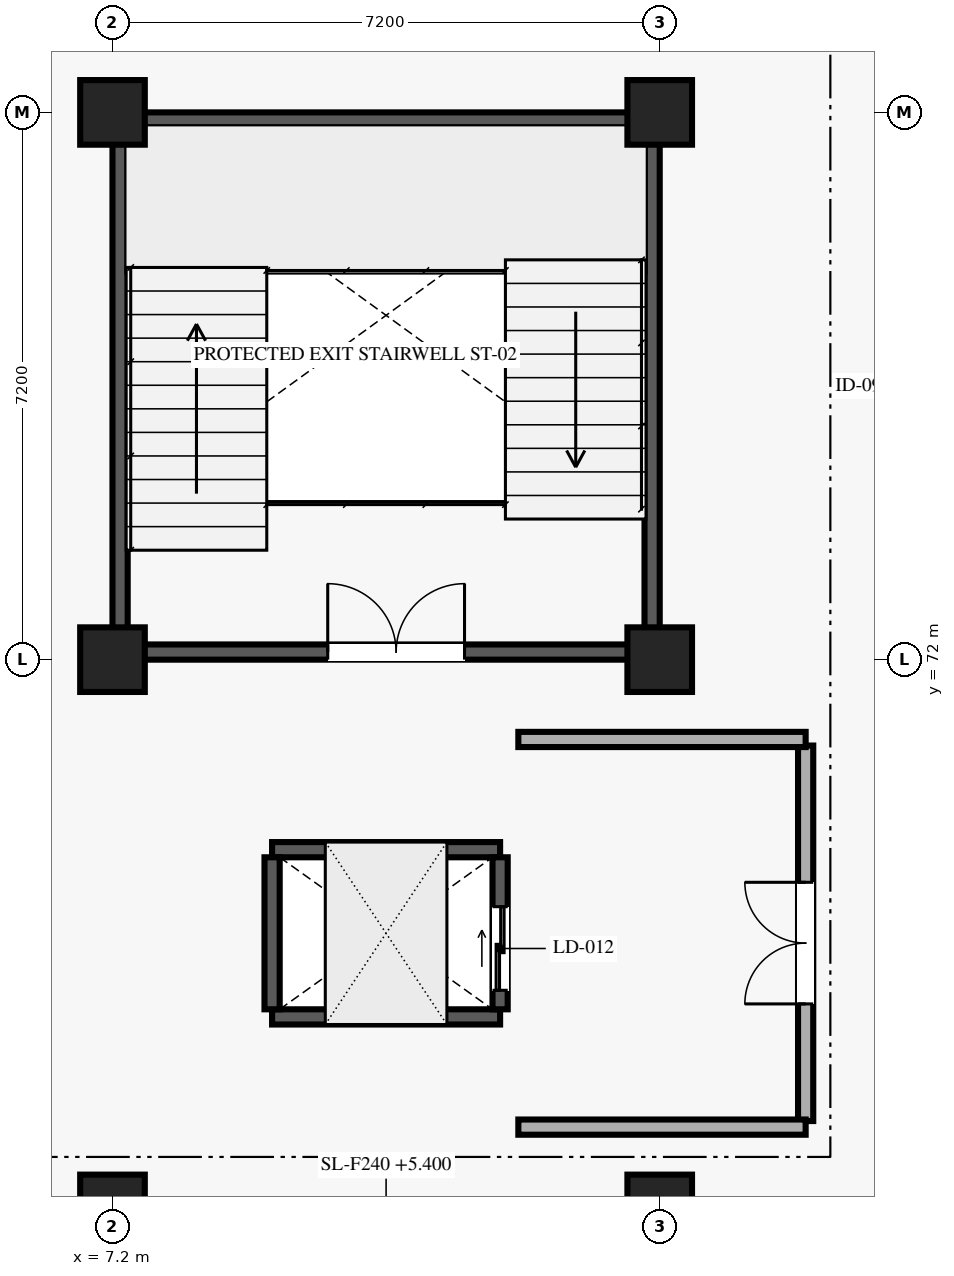
"""IFC4 building model, lengths in metres.
Left out: names, types, materials, properties, quantities, classifications, styles, units other than length and angle.
Written with IfcOpenShell. Run it as: python <this file> out.ifc"""

import sys

from ifc_helpers import new_model, si_unit, direction, frame, frame_2d, origin, origin_2d, place, context, subcontext, project, spatial, rectangle, extrude, element, fill, save


model = new_model("IFC4")
c1 = context("Model", 3, precision=1e-05, world=origin(), true_north=direction((0.0, 1.0)))
c2 = subcontext(c1, "Body", "Model", "MODEL_VIEW")
j1 = project(units=[si_unit("LENGTHUNIT", "METRE"), si_unit("PLANEANGLEUNIT", "RADIAN")], contexts=[c1])
p1 = place(None, origin())
s1 = spatial("IfcSite", under=j1, at=p1, CompositionType="ELEMENT")
p2 = place(p1, origin())
s2 = spatial("IfcBuilding", under=s1, at=p2, CompositionType="ELEMENT")
p3 = place(p2, frame((0.0, 0.0, 5.4)))
s3 = spatial("IfcBuildingStorey", under=s2, at=p3, CompositionType="ELEMENT", Elevation=5.4)
for number, where, z_axis, x_axis in (
    (1, (7.2, 64.8, 0.0), (0.0, 0.0, 1.0), (1.0, 0.0, 0.0)),
    (2, (7.2, 72.0, 0.0), (0.0, 0.0, 1.0), (1.0, 0.0, 0.0)),
    (3, (7.2, 79.2, 0.0), (0.0, 0.0, 1.0), (1.0, 0.0, 0.0)),
    (4, (14.4, 64.8, 0.0), (0.0, 0.0, 1.0), (1.0, 0.0, 0.0)),
    (5, (14.4, 72.0, 0.0), (0.0, 0.0, 1.0), (1.0, 0.0, 0.0)),
    (6, (14.4, 79.2, 0.0), (0.0, 0.0, 1.0), (1.0, 0.0, 0.0)),
):
    element("IfcColumn", number, at=place(p3, frame(where, z_axis=z_axis, x_axis=x_axis)), inside=s3, PredefinedType="COLUMN", context=c2, shape_type="SweptSolid", body=[
        extrude(rectangle(XDim=0.85, YDim=0.85, at=origin_2d()), origin(), (0.0, 0.0, 1.0), 4.05),
    ])
p4 = place(p3, frame((7.4, 72.1, 0.0), z_axis=(0.0, 0.0, 1.0), x_axis=(1.0, 0.0, 0.0)))
e7 = element("IfcWall", 7, at=p4, inside=s3, PredefinedType="SHEAR", context=c2, shape_type="SweptSolid", body=[
    extrude(rectangle(XDim=6.8, YDim=0.2, at=frame_2d((3.4, 0.0))), origin(), (0.0, 0.0, 1.0), 3.81),
])
p5 = place(p4, frame((2.632, 0.0, 0.0)))
e8 = element("IfcOpeningElement", 8, at=p5, cuts=e7, PredefinedType="OPENING", context=c2, shape_type="SweptSolid", body=[
    extrude(rectangle(XDim=1.8, YDim=2.2, at=frame_2d((0.9, 1.1))), frame((0.0, 0.11, 0.0), z_axis=(0.0, -1.0, 0.0), x_axis=(1.0, 0.0, 0.0)), (0.0, 0.0, 1.0), 0.22),
])
for number, where, z_axis, x_axis in (
    (9, (7.4, 79.1, 0.0), (0.0, 0.0, 1.0), (1.0, 0.0, 0.0)),
    (10, (7.3, 72.2, 0.0), (0.0, 0.0, 1.0), (0.0, 1.0, 0.0)),
    (11, (14.3, 72.2, 0.0), (0.0, 0.0, 1.0), (0.0, 1.0, 0.0)),
):
    element("IfcWall", number, at=place(p3, frame(where, z_axis=z_axis, x_axis=x_axis)), inside=s3, PredefinedType="SHEAR", context=c2, shape_type="SweptSolid", body=[
        extrude(rectangle(XDim=6.8, YDim=0.2, at=frame_2d((3.4, 0.0))), origin(), (0.0, 0.0, 1.0), 3.81),
    ])
for number, where, z_axis, x_axis in (
    (12, (9.3, 67.3, 0.0), (0.0, 0.0, 1.0), (1.0, 0.0, 0.0)),
    (13, (9.3, 69.5, 0.0), (0.0, 0.0, 1.0), (1.0, 0.0, 0.0)),
):
    element("IfcWall", number, at=place(p3, frame(where, z_axis=z_axis, x_axis=x_axis)), inside=s3, PredefinedType="SHEAR", context=c2, shape_type="SweptSolid", body=[
        extrude(rectangle(XDim=3.0, YDim=0.2, at=frame_2d((1.5, 0.0))), origin(), (0.0, 0.0, 1.0), 3.81),
    ])
p6 = place(p3, frame((9.3, 67.4, 0.0), z_axis=(0.0, 0.0, 1.0), x_axis=(0.0, 1.0, 0.0)))
e14 = element("IfcWall", 14, at=p6, inside=s3, PredefinedType="SHEAR", context=c2, shape_type="SweptSolid", body=[
    extrude(rectangle(XDim=2.0, YDim=0.2, at=frame_2d((1.0, 0.0))), origin(), (0.0, 0.0, 1.0), 3.81),
])
p7 = place(p3, frame((12.3, 67.4, 0.0), z_axis=(0.0, 0.0, 1.0), x_axis=(0.0, 1.0, 0.0)))
e15 = element("IfcWall", 15, at=p7, inside=s3, PredefinedType="SHEAR", context=c2, shape_type="SweptSolid", body=[
    extrude(rectangle(XDim=2.0, YDim=0.2, at=frame_2d((1.0, 0.0))), origin(), (0.0, 0.0, 1.0), 3.81),
])
p8 = place(p7, frame((0.25, 0.0, 0.0)))
e16 = element("IfcOpeningElement", 16, at=p8, cuts=e15, PredefinedType="OPENING", context=c2, shape_type="SweptSolid", body=[
    extrude(rectangle(XDim=1.1, YDim=2.15, at=frame_2d((0.55, 1.075))), frame((0.0, 0.11, 0.0), z_axis=(0.0, -1.0, 0.0), x_axis=(1.0, 0.0, 0.0)), (0.0, 0.0, 1.0), 0.22),
])
p9 = place(p3, frame((16.32, 65.93, 0.0), z_axis=(0.0, 0.0, 1.0), x_axis=(0.0, 1.0, 0.0)))
e17 = element("IfcWall", 17, at=p9, inside=s3, PredefinedType="SOLIDWALL", context=c2, shape_type="SweptSolid", body=[
    extrude(rectangle(XDim=4.94, YDim=0.2, at=frame_2d((2.47, 0.0))), origin(), (0.0, 0.0, 1.0), 3.81),
])
p10 = place(p9, frame((1.541, 0.0, 0.0)))
e18 = element("IfcOpeningElement", 18, at=p10, cuts=e17, PredefinedType="OPENING", context=c2, shape_type="SweptSolid", body=[
    extrude(rectangle(XDim=1.6, YDim=2.2, at=frame_2d((0.8, 1.1))), frame((0.0, 0.11, 0.0), z_axis=(0.0, -1.0, 0.0), x_axis=(1.0, 0.0, 0.0)), (0.0, 0.0, 1.0), 0.22),
])
for number, where, z_axis, x_axis in (
    (19, (12.54, 65.85, 0.0), (0.0, 0.0, 1.0), (1.0, 0.0, 0.0)),
    (20, (12.54, 70.95, 0.0), (0.0, 0.0, 1.0), (1.0, 0.0, 0.0)),
):
    element("IfcWall", number, at=place(p3, frame(where, z_axis=z_axis, x_axis=x_axis)), inside=s3, PredefinedType="SOLIDWALL", context=c2, shape_type="SweptSolid", body=[
        extrude(rectangle(XDim=3.78, YDim=0.2, at=frame_2d((1.89, 0.0))), origin(), (0.0, 0.0, 1.0), 3.81),
    ])
p11 = place(p5, origin())
e21 = element("IfcDoor", 21, at=p11, inside=s3, OperationType="DOUBLE_DOOR_SINGLE_SWING", PredefinedType="DOOR", context=c2, shape_type="SweptSolid", body=[
    extrude(rectangle(XDim=1.8, YDim=2.2, at=frame_2d((0.9, 1.1))), frame((0.0, 0.025, 0.0), z_axis=(0.0, -1.0, 0.0), x_axis=(1.0, 0.0, 0.0)), (0.0, 0.0, 1.0), 0.05),
])
fill(e8, e21)
p12 = place(p8, origin())
e22 = element("IfcDoor", 22, at=p12, inside=s3, OperationType="DOUBLE_DOOR_SLIDING", PredefinedType="DOOR", context=c2, shape_type="SweptSolid", body=[
    extrude(rectangle(XDim=1.1, YDim=2.15, at=frame_2d((0.55, 1.075))), frame((0.0, 0.025, 0.0), z_axis=(0.0, -1.0, 0.0), x_axis=(1.0, 0.0, 0.0)), (0.0, 0.0, 1.0), 0.05),
])
fill(e16, e22)
p13 = place(p10, origin())
e23 = element("IfcDoor", 23, at=p13, inside=s3, OperationType="DOUBLE_DOOR_SINGLE_SWING", PredefinedType="DOOR", context=c2, shape_type="SweptSolid", body=[
    extrude(rectangle(XDim=1.6, YDim=2.2, at=frame_2d((0.8, 1.1))), frame((0.0, 0.025, 0.0), z_axis=(0.0, -1.0, 0.0), x_axis=(1.0, 0.0, 0.0)), (0.0, 0.0, 1.0), 0.05),
])
fill(e18, e23)
save(model, sys.argv[1])
